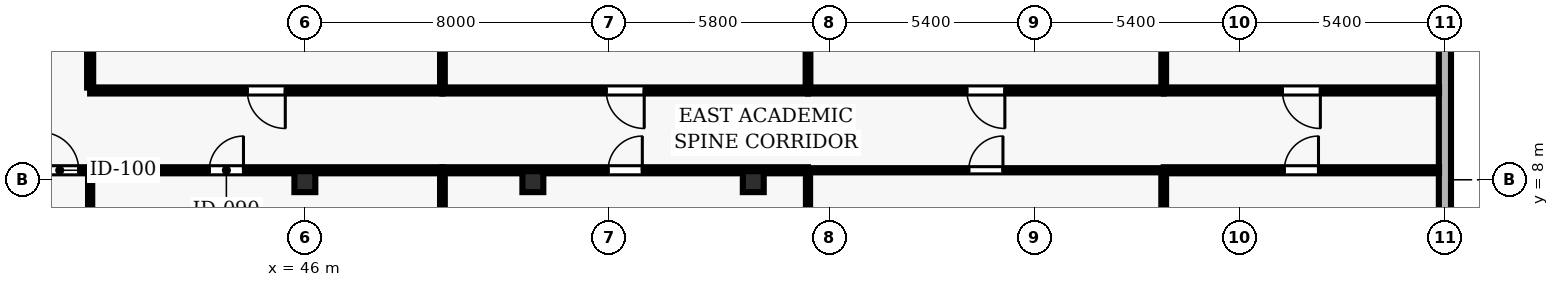
"""IFC4 building model, lengths in metres.
Left out: names, types, materials, properties, quantities, classifications, styles, units other than length and angle.
Written with IfcOpenShell. Run it as: python <this file> out.ifc"""

import sys

from ifc_helpers import new_model, si_unit, direction, frame, frame_2d, origin, origin_2d, place, context, subcontext, project, spatial, rectangle, hollow_rectangle, extrude, element, fill, save


model = new_model("IFC4")
c1 = context("Model", 3, precision=1e-05, world=origin(), true_north=direction((0.0, 1.0)))
c2 = subcontext(c1, "Body", "Model", "MODEL_VIEW")
j1 = project(units=[si_unit("LENGTHUNIT", "METRE"), si_unit("PLANEANGLEUNIT", "RADIAN")], contexts=[c1])
p1 = place(None, origin())
s1 = spatial("IfcSite", under=j1, at=p1, CompositionType="ELEMENT")
p2 = place(p1, origin())
s2 = spatial("IfcBuilding", under=s1, at=p2, CompositionType="ELEMENT")
p3 = place(p2, frame((0.0, 0.0, 89.5)))
s3 = spatial("IfcBuildingStorey", under=s2, at=p3, CompositionType="ELEMENT", Elevation=89.5)
for number, where, z_axis, x_axis in (
    (1, (46.0, 7.95, 0.0), (0.0, 0.0, 1.0), (1.0, 0.0, 0.0)),
    (2, (52.0, 7.95, 0.0), (0.0, 0.0, 1.0), (1.0, 0.0, 0.0)),
    (3, (57.8, 7.95, 0.0), (0.0, 0.0, 1.0), (1.0, 0.0, 0.0)),
):
    element("IfcColumn", number, at=place(p3, frame(where, z_axis=z_axis, x_axis=x_axis)), inside=s3, PredefinedType="COLUMN", context=c2, shape_type="SweptSolid", body=[
        extrude(hollow_rectangle(XDim=0.55, YDim=0.55, WallThickness=0.025, at=origin_2d()), origin(), (0.0, 0.0, 1.0), 3.9),
    ])
p4 = place(p3, frame((76.0, 2.5, 0.0), z_axis=(0.0, 0.0, 1.0), x_axis=(0.0, 1.0, 0.0)))
e4 = element("IfcWall", 4, at=p4, inside=s3, PredefinedType="SOLIDWALL", context=c2, shape_type="SweptSolid", body=[
    extrude(rectangle(XDim=11.0, YDim=0.32, at=frame_2d((5.5, 0.0))), origin(), (0.0, 0.0, 1.0), 3.64),
])
p5 = place(p4, frame((1.25, 0.0, 0.9)))
e5 = element("IfcOpeningElement", 5, at=p5, cuts=e4, PredefinedType="OPENING", context=c2, shape_type="SweptSolid", body=[
    extrude(rectangle(XDim=3.0, YDim=2.2, at=frame_2d((1.5, 1.1))), frame((0.0, 0.17, 0.0), z_axis=(0.0, -1.0, 0.0), x_axis=(1.0, 0.0, 0.0)), (0.0, 0.0, 1.0), 0.34),
])
p6 = place(p3, frame((38.05, 8.25, 0.0), z_axis=(0.0, 0.0, 1.0), x_axis=(1.0, 0.0, 0.0)))
e6 = element("IfcWall", 6, at=p6, inside=s3, PredefinedType="PARTITIONING", context=c2, shape_type="SweptSolid", body=[
    extrude(rectangle(XDim=2.3, YDim=0.16, at=frame_2d((1.15, 0.0))), origin(), (0.0, 0.0, 1.0), 3.005),
])
p7 = place(p6, frame((1.0, 0.0, 0.0)))
e7 = element("IfcOpeningElement", 7, at=p7, cuts=e6, PredefinedType="OPENING", context=c2, shape_type="SweptSolid", body=[
    extrude(rectangle(XDim=1.0, YDim=2.1, at=frame_2d((0.5, 1.05))), frame((0.0, 0.09, 0.0), z_axis=(0.0, -1.0, 0.0), x_axis=(1.0, 0.0, 0.0)), (0.0, 0.0, 1.0), 0.18),
])
p8 = place(p3, frame((40.35, 8.25, 0.0), z_axis=(0.0, 0.0, 1.0), x_axis=(1.0, 0.0, 0.0)))
e8 = element("IfcWall", 8, at=p8, inside=s3, PredefinedType="PARTITIONING", context=c2, shape_type="SweptSolid", body=[
    extrude(rectangle(XDim=9.27, YDim=0.16, at=frame_2d((4.635, 0.0))), origin(), (0.0, 0.0, 1.0), 3.005),
])
p9 = place(p8, frame((3.135, 0.0, 0.0)))
e9 = element("IfcOpeningElement", 9, at=p9, cuts=e8, PredefinedType="OPENING", context=c2, shape_type="SweptSolid", body=[
    extrude(rectangle(XDim=0.9, YDim=2.1, at=frame_2d((0.45, 1.05))), frame((0.0, 0.09, 0.0), z_axis=(0.0, -1.0, 0.0), x_axis=(1.0, 0.0, 0.0)), (0.0, 0.0, 1.0), 0.18),
])
p10 = place(p3, frame((49.62, 8.25, 0.0), z_axis=(0.0, 0.0, 1.0), x_axis=(1.0, 0.0, 0.0)))
e10 = element("IfcWall", 10, at=p10, inside=s3, PredefinedType="PARTITIONING", context=c2, shape_type="SweptSolid", body=[
    extrude(rectangle(XDim=9.62, YDim=0.16, at=frame_2d((4.81, 0.0))), origin(), (0.0, 0.0, 1.0), 3.005),
])
p11 = place(p10, frame((4.36, 0.0, 0.0)))
e11 = element("IfcOpeningElement", 11, at=p11, cuts=e10, PredefinedType="OPENING", context=c2, shape_type="SweptSolid", body=[
    extrude(rectangle(XDim=0.9, YDim=2.1, at=frame_2d((0.45, 1.05))), frame((0.0, 0.09, 0.0), z_axis=(0.0, -1.0, 0.0), x_axis=(1.0, 0.0, 0.0)), (0.0, 0.0, 1.0), 0.18),
])
p12 = place(p3, frame((49.62, 10.35, 0.0), z_axis=(0.0, 0.0, 1.0), x_axis=(-1.0, 0.0, 0.0)))
e12 = element("IfcWall", 12, at=p12, inside=s3, PredefinedType="PARTITIONING", context=c2, shape_type="SweptSolid", body=[
    extrude(rectangle(XDim=9.27, YDim=0.16, at=frame_2d((4.635, 0.0))), origin(), (0.0, 0.0, 1.0), 3.227),
])
p13 = place(p12, frame((4.135, 0.0, 0.0)))
e13 = element("IfcOpeningElement", 13, at=p13, cuts=e12, PredefinedType="OPENING", context=c2, shape_type="SweptSolid", body=[
    extrude(rectangle(XDim=1.0, YDim=2.1, at=frame_2d((0.5, 1.05))), frame((0.0, 0.09, 0.0), z_axis=(0.0, -1.0, 0.0), x_axis=(1.0, 0.0, 0.0)), (0.0, 0.0, 1.0), 0.18),
])
p14 = place(p3, frame((59.24, 8.25, 0.0), z_axis=(0.0, 0.0, 1.0), x_axis=(1.0, 0.0, 0.0)))
e14 = element("IfcWall", 14, at=p14, inside=s3, PredefinedType="MOVABLE", context=c2, shape_type="SweptSolid", body=[
    extrude(rectangle(XDim=9.36, YDim=0.11, at=frame_2d((4.68, 0.0))), origin(), (0.0, 0.0, 1.0), 3.64),
])
p15 = place(p14, frame((4.23, 0.0, 0.0)))
e15 = element("IfcOpeningElement", 15, at=p15, cuts=e14, PredefinedType="OPENING", context=c2, shape_type="SweptSolid", body=[
    extrude(rectangle(XDim=0.9, YDim=2.1, at=frame_2d((0.45, 1.05))), frame((0.0, 0.065, 0.0), z_axis=(0.0, -1.0, 0.0), x_axis=(1.0, 0.0, 0.0)), (0.0, 0.0, 1.0), 0.13),
])
p16 = place(p3, frame((59.24, 10.35, 0.0), z_axis=(0.0, 0.0, 1.0), x_axis=(-1.0, 0.0, 0.0)))
e16 = element("IfcWall", 16, at=p16, inside=s3, PredefinedType="PARTITIONING", context=c2, shape_type="SweptSolid", body=[
    extrude(rectangle(XDim=9.62, YDim=0.16, at=frame_2d((4.81, 0.0))), origin(), (0.0, 0.0, 1.0), 3.227),
])
p17 = place(p16, frame((4.31, 0.0, 0.0)))
e17 = element("IfcOpeningElement", 17, at=p17, cuts=e16, PredefinedType="OPENING", context=c2, shape_type="SweptSolid", body=[
    extrude(rectangle(XDim=1.0, YDim=2.1, at=frame_2d((0.5, 1.05))), frame((0.0, 0.09, 0.0), z_axis=(0.0, -1.0, 0.0), x_axis=(1.0, 0.0, 0.0)), (0.0, 0.0, 1.0), 0.18),
])
p18 = place(p3, frame((68.6, 8.25, 0.0), z_axis=(0.0, 0.0, 1.0), x_axis=(1.0, 0.0, 0.0)))
e18 = element("IfcWall", 18, at=p18, inside=s3, PredefinedType="PARTITIONING", context=c2, shape_type="SweptSolid", body=[
    extrude(rectangle(XDim=7.245, YDim=0.16, at=frame_2d((3.623, 0.0))), origin(), (0.0, 0.0, 1.0), 3.64),
])
p19 = place(p18, frame((3.173, 0.0, 0.0)))
e19 = element("IfcOpeningElement", 19, at=p19, cuts=e18, PredefinedType="OPENING", context=c2, shape_type="SweptSolid", body=[
    extrude(rectangle(XDim=0.9, YDim=2.1, at=frame_2d((0.45, 1.05))), frame((0.0, 0.09, 0.0), z_axis=(0.0, -1.0, 0.0), x_axis=(1.0, 0.0, 0.0)), (0.0, 0.0, 1.0), 0.18),
])
p20 = place(p3, frame((68.6, 10.35, 0.0), z_axis=(0.0, 0.0, 1.0), x_axis=(-1.0, 0.0, 0.0)))
e20 = element("IfcWall", 20, at=p20, inside=s3, PredefinedType="PARTITIONING", context=c2, shape_type="SweptSolid", body=[
    extrude(rectangle(XDim=9.36, YDim=0.16, at=frame_2d((4.68, 0.0))), origin(), (0.0, 0.0, 1.0), 3.227),
])
p21 = place(p20, frame((4.18, 0.0, 0.0)))
e21 = element("IfcOpeningElement", 21, at=p21, cuts=e20, PredefinedType="OPENING", context=c2, shape_type="SweptSolid", body=[
    extrude(rectangle(XDim=1.0, YDim=2.1, at=frame_2d((0.5, 1.05))), frame((0.0, 0.09, 0.0), z_axis=(0.0, -1.0, 0.0), x_axis=(1.0, 0.0, 0.0)), (0.0, 0.0, 1.0), 0.18),
])
p22 = place(p3, frame((75.845, 10.35, 0.0), z_axis=(0.0, 0.0, 1.0), x_axis=(-1.0, 0.0, 0.0)))
e22 = element("IfcWall", 22, at=p22, inside=s3, PredefinedType="PARTITIONING", context=c2, shape_type="SweptSolid", body=[
    extrude(rectangle(XDim=7.245, YDim=0.16, at=frame_2d((3.623, 0.0))), origin(), (0.0, 0.0, 1.0), 3.64),
])
p23 = place(p22, frame((3.123, 0.0, 0.0)))
e23 = element("IfcOpeningElement", 23, at=p23, cuts=e22, PredefinedType="OPENING", context=c2, shape_type="SweptSolid", body=[
    extrude(rectangle(XDim=1.0, YDim=2.1, at=frame_2d((0.5, 1.05))), frame((0.0, 0.09, 0.0), z_axis=(0.0, -1.0, 0.0), x_axis=(1.0, 0.0, 0.0)), (0.0, 0.0, 1.0), 0.18),
])
p24 = place(p3, frame((40.35, 0.155, 0.0), z_axis=(0.0, 0.0, 1.0), x_axis=(0.0, 1.0, 0.0)))
e24 = element("IfcWall", 24, at=p24, inside=s3, PredefinedType="MOVABLE", context=c2, shape_type="SweptSolid", body=[
    extrude(rectangle(XDim=8.02, YDim=0.11, at=frame_2d((4.01, 0.0))), origin(), (0.0, 0.0, 1.0), 3.64),
])
p25 = place(p3, frame((40.35, 10.425, 0.0), z_axis=(0.0, 0.0, 1.0), x_axis=(0.0, 1.0, 0.0)))
e25 = element("IfcWall", 25, at=p25, inside=s3, PredefinedType="PARTITIONING", context=c2, shape_type="SweptSolid", body=[
    extrude(rectangle(XDim=5.5, YDim=0.16, at=frame_2d((2.75, 0.0))), origin(), (0.0, 0.0, 1.0), 3.227),
])
p26 = place(p3, frame((49.62, 0.155, 0.0), z_axis=(0.0, 0.0, 1.0), x_axis=(0.0, 1.0, 0.0)))
e26 = element("IfcWall", 26, at=p26, inside=s3, PredefinedType="PARTITIONING", context=c2, shape_type="SweptSolid", body=[
    extrude(rectangle(XDim=8.02, YDim=0.125, at=frame_2d((4.01, 0.0))), origin(), (0.0, 0.0, 1.0), 3.64),
])
p27 = place(p3, frame((49.62, 10.425, 0.0), z_axis=(0.0, 0.0, 1.0), x_axis=(0.0, 1.0, 0.0)))
e27 = element("IfcWall", 27, at=p27, inside=s3, PredefinedType="PARTITIONING", context=c2, shape_type="SweptSolid", body=[
    extrude(rectangle(XDim=5.42, YDim=0.125, at=frame_2d((2.71, 0.0))), origin(), (0.0, 0.0, 1.0), 3.64),
])
p28 = place(p3, frame((59.24, 0.155, 0.0), z_axis=(0.0, 0.0, 1.0), x_axis=(0.0, 1.0, 0.0)))
e28 = element("IfcWall", 28, at=p28, inside=s3, PredefinedType="MOVABLE", context=c2, shape_type="SweptSolid", body=[
    extrude(rectangle(XDim=8.02, YDim=0.11, at=frame_2d((4.01, 0.0))), origin(), (0.0, 0.0, 1.0), 3.64),
])
p29 = place(p3, frame((59.24, 10.425, 0.0), z_axis=(0.0, 0.0, 1.0), x_axis=(0.0, 1.0, 0.0)))
e29 = element("IfcWall", 29, at=p29, inside=s3, PredefinedType="PARTITIONING", context=c2, shape_type="SweptSolid", body=[
    extrude(rectangle(XDim=5.42, YDim=0.125, at=frame_2d((2.71, 0.0))), origin(), (0.0, 0.0, 1.0), 3.64),
])
p30 = place(p3, frame((68.6, 0.155, 0.0), z_axis=(0.0, 0.0, 1.0), x_axis=(0.0, 1.0, 0.0)))
e30 = element("IfcWall", 30, at=p30, inside=s3, PredefinedType="PARTITIONING", context=c2, shape_type="SweptSolid", body=[
    extrude(rectangle(XDim=8.02, YDim=0.125, at=frame_2d((4.01, 0.0))), origin(), (0.0, 0.0, 1.0), 3.005),
])
p31 = place(p3, frame((68.6, 10.425, 0.0), z_axis=(0.0, 0.0, 1.0), x_axis=(0.0, 1.0, 0.0)))
e31 = element("IfcWall", 31, at=p31, inside=s3, PredefinedType="PARTITIONING", context=c2, shape_type="SweptSolid", body=[
    extrude(rectangle(XDim=5.42, YDim=0.125, at=frame_2d((2.71, 0.0))), origin(), (0.0, 0.0, 1.0), 3.005),
])
p32 = place(p7, origin())
e32 = element("IfcDoor", 32, at=p32, inside=s3, OperationType="SINGLE_SWING_LEFT", PredefinedType="DOOR", context=c2, shape_type="SweptSolid", body=[
    extrude(rectangle(XDim=1.0, YDim=2.1, at=frame_2d((0.5, 1.05))), frame((0.0, 0.025, 0.0), z_axis=(0.0, -1.0, 0.0), x_axis=(1.0, 0.0, 0.0)), (0.0, 0.0, 1.0), 0.05),
])
fill(e7, e32)
p33 = place(p9, origin())
e33 = element("IfcDoor", 33, at=p33, inside=s3, OperationType="SINGLE_SWING_RIGHT", PredefinedType="DOOR", context=c2, shape_type="SweptSolid", body=[
    extrude(rectangle(XDim=0.9, YDim=2.1, at=frame_2d((0.45, 1.05))), frame((0.0, 0.025, 0.0), z_axis=(0.0, -1.0, 0.0), x_axis=(1.0, 0.0, 0.0)), (0.0, 0.0, 1.0), 0.05),
])
fill(e9, e33)
p34 = place(p13, origin())
e34 = element("IfcDoor", 34, at=p34, inside=s3, OperationType="SINGLE_SWING_LEFT", PredefinedType="DOOR", context=c2, shape_type="SweptSolid", body=[
    extrude(rectangle(XDim=1.0, YDim=2.1, at=frame_2d((0.5, 1.05))), frame((0.0, 0.025, 0.0), z_axis=(0.0, -1.0, 0.0), x_axis=(1.0, 0.0, 0.0)), (0.0, 0.0, 1.0), 0.05),
])
fill(e13, e34)
p35 = place(p11, origin())
e35 = element("IfcDoor", 35, at=p35, inside=s3, OperationType="SINGLE_SWING_RIGHT", PredefinedType="DOOR", context=c2, shape_type="SweptSolid", body=[
    extrude(rectangle(XDim=0.9, YDim=2.1, at=frame_2d((0.45, 1.05))), frame((0.0, 0.025, 0.0), z_axis=(0.0, -1.0, 0.0), x_axis=(1.0, 0.0, 0.0)), (0.0, 0.0, 1.0), 0.05),
])
fill(e11, e35)
p36 = place(p17, origin())
e36 = element("IfcDoor", 36, at=p36, inside=s3, OperationType="SINGLE_SWING_LEFT", PredefinedType="DOOR", context=c2, shape_type="SweptSolid", body=[
    extrude(rectangle(XDim=1.0, YDim=2.1, at=frame_2d((0.5, 1.05))), frame((0.0, 0.025, 0.0), z_axis=(0.0, -1.0, 0.0), x_axis=(1.0, 0.0, 0.0)), (0.0, 0.0, 1.0), 0.05),
])
fill(e17, e36)
p37 = place(p15, origin())
e37 = element("IfcDoor", 37, at=p37, inside=s3, OperationType="SINGLE_SWING_RIGHT", PredefinedType="DOOR", context=c2, shape_type="SweptSolid", body=[
    extrude(rectangle(XDim=0.9, YDim=2.1, at=frame_2d((0.45, 1.05))), frame((0.0, 0.025, 0.0), z_axis=(0.0, -1.0, 0.0), x_axis=(1.0, 0.0, 0.0)), (0.0, 0.0, 1.0), 0.05),
])
fill(e15, e37)
p38 = place(p21, origin())
e38 = element("IfcDoor", 38, at=p38, inside=s3, OperationType="SINGLE_SWING_LEFT", PredefinedType="DOOR", context=c2, shape_type="SweptSolid", body=[
    extrude(rectangle(XDim=1.0, YDim=2.1, at=frame_2d((0.5, 1.05))), frame((0.0, 0.025, 0.0), z_axis=(0.0, -1.0, 0.0), x_axis=(1.0, 0.0, 0.0)), (0.0, 0.0, 1.0), 0.05),
])
fill(e21, e38)
p39 = place(p19, origin())
e39 = element("IfcDoor", 39, at=p39, inside=s3, OperationType="SINGLE_SWING_RIGHT", PredefinedType="DOOR", context=c2, shape_type="SweptSolid", body=[
    extrude(rectangle(XDim=0.9, YDim=2.1, at=frame_2d((0.45, 1.05))), frame((0.0, 0.025, 0.0), z_axis=(0.0, -1.0, 0.0), x_axis=(1.0, 0.0, 0.0)), (0.0, 0.0, 1.0), 0.05),
])
fill(e19, e39)
p40 = place(p23, origin())
e40 = element("IfcDoor", 40, at=p40, inside=s3, OperationType="SINGLE_SWING_LEFT", PredefinedType="DOOR", context=c2, shape_type="SweptSolid", body=[
    extrude(rectangle(XDim=1.0, YDim=2.1, at=frame_2d((0.5, 1.05))), frame((0.0, 0.025, 0.0), z_axis=(0.0, -1.0, 0.0), x_axis=(1.0, 0.0, 0.0)), (0.0, 0.0, 1.0), 0.05),
])
fill(e23, e40)
save(model, sys.argv[1])
